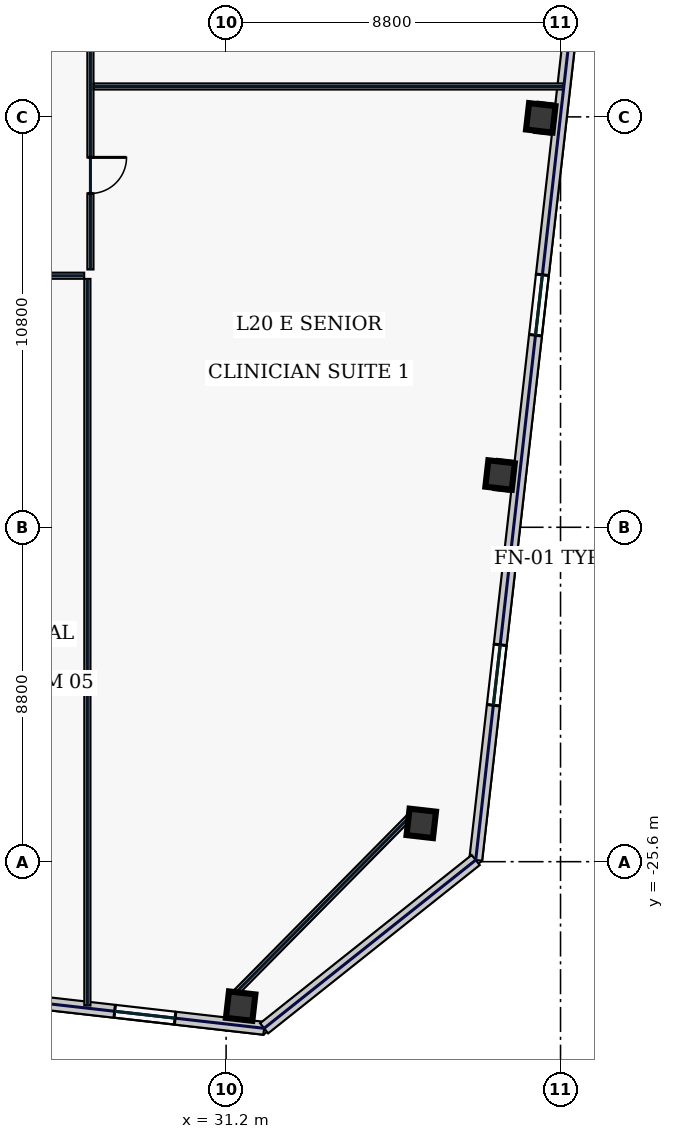
"""IFC4 building model, lengths in metres.
Left out: names, types, materials, properties, quantities, classifications, styles, units other than length and angle.
Written with IfcOpenShell. Run it as: python <this file> out.ifc"""

import sys

from ifc_helpers import new_model, si_unit, direction, frame, frame_2d, origin, origin_2d, place, context, subcontext, project, spatial, rectangle, hollow_rectangle, extrude, element, fill, save


model = new_model("IFC4")
c1 = context("Model", 3, precision=1e-05, world=origin(), true_north=direction((0.0, 1.0)))
c2 = subcontext(c1, "Body", "Model", "MODEL_VIEW")
j1 = project(units=[si_unit("LENGTHUNIT", "METRE"), si_unit("PLANEANGLEUNIT", "RADIAN")], contexts=[c1])
p1 = place(None, origin())
s1 = spatial("IfcSite", under=j1, at=p1, CompositionType="ELEMENT")
p2 = place(p1, origin())
s2 = spatial("IfcBuilding", under=s1, at=p2, CompositionType="ELEMENT")
p3 = place(p2, frame((0.0, 0.0, 93.4)))
s3 = spatial("IfcBuildingStorey", under=s2, at=p3, CompositionType="ELEMENT", Elevation=93.4)
for number, where, z_axis, x_axis in (
    (1, (31.583, -29.401, 0.0), (0.0, 0.0, 1.0), (0.994, -0.113, 0.0)),
    (2, (36.336, -24.592, 0.0), (0.0, 0.0, 1.0), (0.994, -0.113, 0.0)),
    (3, (38.409, -15.424, 0.0), (0.0, 0.0, 1.0), (0.994, -0.113, 0.0)),
    (4, (39.48, -6.025, 0.0), (0.0, 0.0, 1.0), (0.994, -0.113, 0.0)),
):
    element("IfcColumn", number, at=place(p3, frame(where, z_axis=z_axis, x_axis=x_axis)), inside=s3, PredefinedType="COLUMN", context=c2, shape_type="SweptSolid", body=[
        extrude(hollow_rectangle(XDim=0.7, YDim=0.7, WallThickness=0.032, at=origin_2d()), origin(), (0.0, 0.0, 1.0), 3.74),
    ])
p4 = place(p3, frame((11.115, -27.582, 0.0), z_axis=(0.0, 0.0, 1.0), x_axis=(0.993572655904, -0.113196190044, 0.0)))
e5 = element("IfcWall", 5, at=p4, inside=s3, PredefinedType="STANDARD", context=c2, shape_type="SweptSolid", body=[
    extrude(rectangle(XDim=21.223, YDim=0.34, at=frame_2d((10.611, 0.0))), origin(), (0.0, 0.0, 1.0), 3.74),
])
p5 = place(p4, frame((4.866, 0.0, 0.67)))
e6 = element("IfcOpeningElement", 6, at=p5, cuts=e5, PredefinedType="OPENING", context=c2, shape_type="SweptSolid", body=[
    extrude(rectangle(XDim=0.85, YDim=1.85, at=frame_2d((0.425, 0.925))), frame((0.0, 0.18, 0.0), z_axis=(0.0, -1.0, 0.0), x_axis=(1.0, 0.0, 0.0)), (0.0, 0.0, 1.0), 0.36),
])
p6 = place(p4, frame((7.838, 0.0, 0.67)))
e7 = element("IfcOpeningElement", 7, at=p6, cuts=e5, PredefinedType="OPENING", context=c2, shape_type="SweptSolid", body=[
    extrude(rectangle(XDim=0.85, YDim=1.85, at=frame_2d((0.425, 0.925))), frame((0.0, 0.18, 0.0), z_axis=(0.0, -1.0, 0.0), x_axis=(1.0, 0.0, 0.0)), (0.0, 0.0, 1.0), 0.36),
])
p7 = place(p4, frame((12.794, 0.0, 0.67)))
e8 = element("IfcOpeningElement", 8, at=p7, cuts=e5, PredefinedType="OPENING", context=c2, shape_type="SweptSolid", body=[
    extrude(rectangle(XDim=2.1, YDim=2.2, at=frame_2d((1.05, 1.1))), frame((0.0, 0.18, 0.0), z_axis=(0.0, -1.0, 0.0), x_axis=(1.0, 0.0, 0.0)), (0.0, 0.0, 1.0), 0.36),
])
p8 = place(p4, frame((17.265, 0.0, 0.22)))
e9 = element("IfcOpeningElement", 9, at=p8, cuts=e5, PredefinedType="OPENING", context=c2, shape_type="SweptSolid", body=[
    extrude(rectangle(XDim=1.6, YDim=1.2, at=frame_2d((0.8, 0.6))), frame((0.0, 0.18, 0.0), z_axis=(0.0, -1.0, 0.0), x_axis=(1.0, 0.0, 0.0)), (0.0, 0.0, 1.0), 0.36),
])
p9 = place(p3, frame((37.768, -25.556, 0.0), z_axis=(0.0, 0.0, 1.0), x_axis=(0.113201605824, 0.993572038877, 0.0)))
e10 = element("IfcWall", 10, at=p9, inside=s3, PredefinedType="STANDARD", context=c2, shape_type="SweptSolid", body=[
    extrude(rectangle(XDim=39.2, YDim=0.34, at=frame_2d((19.6, 0.0))), origin(), (0.0, 0.0, 1.0), 3.74),
])
p10 = place(p9, frame((4.1, 0.0, 0.58)))
e11 = element("IfcOpeningElement", 11, at=p10, cuts=e10, PredefinedType="OPENING", context=c2, shape_type="SweptSolid", body=[
    extrude(rectangle(XDim=1.6, YDim=2.3, at=frame_2d((0.8, 1.15))), frame((0.0, 0.18, 0.0), z_axis=(0.0, -1.0, 0.0), x_axis=(1.0, 0.0, 0.0)), (0.0, 0.0, 1.0), 0.36),
])
p11 = place(p9, frame((13.9, 0.0, 0.58)))
e12 = element("IfcOpeningElement", 12, at=p11, cuts=e10, PredefinedType="OPENING", context=c2, shape_type="SweptSolid", body=[
    extrude(rectangle(XDim=1.6, YDim=2.3, at=frame_2d((0.8, 1.15))), frame((0.0, 0.18, 0.0), z_axis=(0.0, -1.0, 0.0), x_axis=(1.0, 0.0, 0.0)), (0.0, 0.0, 1.0), 0.36),
])
p12 = place(p9, frame((23.35, 0.0, 0.75)))
e13 = element("IfcOpeningElement", 13, at=p12, cuts=e10, PredefinedType="OPENING", context=c2, shape_type="SweptSolid", body=[
    extrude(rectangle(XDim=0.85, YDim=1.85, at=frame_2d((0.425, 0.925))), frame((0.0, 0.18, 0.0), z_axis=(0.0, -1.0, 0.0), x_axis=(1.0, 0.0, 0.0)), (0.0, 0.0, 1.0), 0.36),
])
p13 = place(p9, frame((33.5, 0.0, 0.58)))
e14 = element("IfcOpeningElement", 14, at=p13, cuts=e10, PredefinedType="OPENING", context=c2, shape_type="SweptSolid", body=[
    extrude(rectangle(XDim=1.6, YDim=2.3, at=frame_2d((0.8, 1.15))), frame((0.0, 0.18, 0.0), z_axis=(0.0, -1.0, 0.0), x_axis=(1.0, 0.0, 0.0)), (0.0, 0.0, 1.0), 0.36),
])
p14 = place(p3, frame((32.201, -29.985, 0.0), z_axis=(0.0, 0.0, 1.0), x_axis=(0.78261359446, 0.622507800567, 0.0)))
e15 = element("IfcWall", 15, at=p14, inside=s3, PredefinedType="STANDARD", context=c2, shape_type="SweptSolid", body=[
    extrude(rectangle(XDim=7.114, YDim=0.34, at=frame_2d((3.557, 0.0))), origin(), (0.0, 0.0, 1.0), 3.74),
])
p15 = place(p3, frame((31.341, -29.162, 0.0), z_axis=(0.0, 0.0, 1.0), x_axis=(0.702905898933, 0.711282853192, 0.0)))
e16 = element("IfcWall", 16, at=p15, inside=s3, PredefinedType="PARTITIONING", context=c2, shape_type="SweptSolid", body=[
    extrude(rectangle(XDim=6.761, YDim=0.16, at=frame_2d((3.381, 0.0))), origin(), (0.0, 0.0, 1.0), 3.74),
])
p16 = place(p3, frame((27.63, 10.115, 0.0), z_axis=(0.0, 0.0, 1.0), x_axis=(0.0, -1.0, 0.0)))
e17 = element("IfcWall", 17, at=p16, inside=s3, PredefinedType="PARTITIONING", context=c2, shape_type="SweptSolid", body=[
    extrude(rectangle(XDim=20.13, YDim=0.16, at=frame_2d((10.065, 0.0))), origin(), (0.0, 0.0, 1.0), 3.74),
])
p17 = place(p16, frame((17.181, 0.0, 0.0)))
e18 = element("IfcOpeningElement", 18, at=p17, cuts=e17, PredefinedType="OPENING", context=c2, shape_type="SweptSolid", body=[
    extrude(rectangle(XDim=0.95, YDim=2.2, at=frame_2d((0.475, 1.1))), frame((0.0, 0.09, 0.0), z_axis=(0.0, -1.0, 0.0), x_axis=(1.0, 0.0, 0.0)), (0.0, 0.0, 1.0), 0.18),
])
p18 = place(p16, frame((12.325, 0.0, 0.0)))
e19 = element("IfcOpeningElement", 19, at=p18, cuts=e17, PredefinedType="OPENING", context=c2, shape_type="SweptSolid", body=[
    extrude(rectangle(XDim=0.95, YDim=2.2, at=frame_2d((0.475, 1.1))), frame((0.0, 0.09, 0.0), z_axis=(0.0, -1.0, 0.0), x_axis=(1.0, 0.0, 0.0)), (0.0, 0.0, 1.0), 0.18),
])
p19 = place(p16, frame((7.125, 0.0, 0.0)))
e20 = element("IfcOpeningElement", 20, at=p19, cuts=e17, PredefinedType="OPENING", context=c2, shape_type="SweptSolid", body=[
    extrude(rectangle(XDim=0.95, YDim=2.2, at=frame_2d((0.475, 1.1))), frame((0.0, 0.09, 0.0), z_axis=(0.0, -1.0, 0.0), x_axis=(1.0, 0.0, 0.0)), (0.0, 0.0, 1.0), 0.18),
])
p20 = place(p16, frame((2.219, 0.0, 0.0)))
e21 = element("IfcOpeningElement", 21, at=p20, cuts=e17, PredefinedType="OPENING", context=c2, shape_type="SweptSolid", body=[
    extrude(rectangle(XDim=0.95, YDim=2.2, at=frame_2d((0.475, 1.1))), frame((0.0, 0.09, 0.0), z_axis=(0.0, -1.0, 0.0), x_axis=(1.0, 0.0, 0.0)), (0.0, 0.0, 1.0), 0.18),
])
p21 = place(p3, frame((27.465, -10.18, 0.0), z_axis=(0.0, 0.0, 1.0), x_axis=(-1.0, 0.0, 0.0)))
e22 = element("IfcWall", 22, at=p21, inside=s3, PredefinedType="PARTITIONING", context=c2, shape_type="SweptSolid", body=[
    extrude(rectangle(XDim=54.93, YDim=0.16, at=frame_2d((27.465, 0.0))), origin(), (0.0, 0.0, 1.0), 3.74),
])
p22 = place(p21, frame((51.656, 0.0, 0.0)))
e23 = element("IfcOpeningElement", 23, at=p22, cuts=e22, PredefinedType="OPENING", context=c2, shape_type="SweptSolid", body=[
    extrude(rectangle(XDim=0.95, YDim=2.2, at=frame_2d((0.475, 1.1))), frame((0.0, 0.09, 0.0), z_axis=(0.0, -1.0, 0.0), x_axis=(1.0, 0.0, 0.0)), (0.0, 0.0, 1.0), 0.18),
])
p23 = place(p21, frame((44.747, 0.0, 0.0)))
e24 = element("IfcOpeningElement", 24, at=p23, cuts=e22, PredefinedType="OPENING", context=c2, shape_type="SweptSolid", body=[
    extrude(rectangle(XDim=1.3, YDim=2.2, at=frame_2d((0.65, 1.1))), frame((0.0, 0.09, 0.0), z_axis=(0.0, -1.0, 0.0), x_axis=(1.0, 0.0, 0.0)), (0.0, 0.0, 1.0), 0.18),
])
p24 = place(p21, frame((35.091, 0.0, 0.0)))
e25 = element("IfcOpeningElement", 25, at=p24, cuts=e22, PredefinedType="OPENING", context=c2, shape_type="SweptSolid", body=[
    extrude(rectangle(XDim=1.3, YDim=2.2, at=frame_2d((0.65, 1.1))), frame((0.0, 0.09, 0.0), z_axis=(0.0, -1.0, 0.0), x_axis=(1.0, 0.0, 0.0)), (0.0, 0.0, 1.0), 0.18),
])
p25 = place(p21, frame((29.54, 0.0, 0.0)))
e26 = element("IfcOpeningElement", 26, at=p25, cuts=e22, PredefinedType="OPENING", context=c2, shape_type="SweptSolid", body=[
    extrude(rectangle(XDim=1.45, YDim=2.2, at=frame_2d((0.725, 1.1))), frame((0.0, 0.09, 0.0), z_axis=(0.0, -1.0, 0.0), x_axis=(1.0, 0.0, 0.0)), (0.0, 0.0, 1.0), 0.18),
])
p26 = place(p21, frame((22.872, 0.0, 0.0)))
e27 = element("IfcOpeningElement", 27, at=p26, cuts=e22, PredefinedType="OPENING", context=c2, shape_type="SweptSolid", body=[
    extrude(rectangle(XDim=0.95, YDim=2.2, at=frame_2d((0.475, 1.1))), frame((0.0, 0.09, 0.0), z_axis=(0.0, -1.0, 0.0), x_axis=(1.0, 0.0, 0.0)), (0.0, 0.0, 1.0), 0.18),
])
p27 = place(p21, frame((15.78, 0.0, 0.0)))
e28 = element("IfcOpeningElement", 28, at=p27, cuts=e22, PredefinedType="OPENING", context=c2, shape_type="SweptSolid", body=[
    extrude(rectangle(XDim=0.95, YDim=2.2, at=frame_2d((0.475, 1.1))), frame((0.0, 0.09, 0.0), z_axis=(0.0, -1.0, 0.0), x_axis=(1.0, 0.0, 0.0)), (0.0, 0.0, 1.0), 0.18),
])
p28 = place(p21, frame((9.03, 0.0, 0.0)))
e29 = element("IfcOpeningElement", 29, at=p28, cuts=e22, PredefinedType="OPENING", context=c2, shape_type="SweptSolid", body=[
    extrude(rectangle(XDim=1.05, YDim=2.2, at=frame_2d((0.525, 1.1))), frame((0.0, 0.09, 0.0), z_axis=(0.0, -1.0, 0.0), x_axis=(1.0, 0.0, 0.0)), (0.0, 0.0, 1.0), 0.18),
])
p29 = place(p21, frame((3.044, 0.0, 0.0)))
e30 = element("IfcOpeningElement", 30, at=p29, cuts=e22, PredefinedType="OPENING", context=c2, shape_type="SweptSolid", body=[
    extrude(rectangle(XDim=0.95, YDim=2.2, at=frame_2d((0.475, 1.1))), frame((0.0, 0.09, 0.0), z_axis=(0.0, -1.0, 0.0), x_axis=(1.0, 0.0, 0.0)), (0.0, 0.0, 1.0), 0.18),
])
p30 = place(p3, frame((27.55, -29.385, 0.0), z_axis=(0.0, 0.0, 1.0), x_axis=(0.0, 1.0, 0.0)))
e31 = element("IfcWall", 31, at=p30, inside=s3, PredefinedType="PARTITIONING", context=c2, shape_type="SweptSolid", body=[
    extrude(rectangle(XDim=19.12, YDim=0.16, at=frame_2d((9.56, 0.0))), origin(), (0.0, 0.0, 1.0), 3.74),
])
p31 = place(p3, frame((27.715, -5.2, 0.0), z_axis=(0.0, 0.0, 1.0), x_axis=(1.0, 0.0, 0.0)))
e32 = element("IfcWall", 32, at=p31, inside=s3, PredefinedType="PARTITIONING", context=c2, shape_type="SweptSolid", body=[
    extrude(rectangle(XDim=12.352, YDim=0.16, at=frame_2d((6.176, 0.0))), origin(), (0.0, 0.0, 1.0), 3.74),
])
p32 = place(p8, origin())
e33 = element("IfcWindow", 33, at=p32, inside=s3, PartitioningType="SINGLE_PANEL", PredefinedType="WINDOW", context=c2, shape_type="SweptSolid", body=[
    extrude(rectangle(XDim=1.6, YDim=1.2, at=frame_2d((0.8, 0.6))), frame((0.0, 0.03, 0.0), z_axis=(0.0, -1.0, 0.0), x_axis=(1.0, 0.0, 0.0)), (0.0, 0.0, 1.0), 0.06),
])
fill(e9, e33)
p33 = place(p10, origin())
e34 = element("IfcWindow", 34, at=p33, inside=s3, PartitioningType="SINGLE_PANEL", PredefinedType="WINDOW", context=c2, shape_type="SweptSolid", body=[
    extrude(rectangle(XDim=1.6, YDim=2.3, at=frame_2d((0.8, 1.15))), frame((0.0, 0.03, 0.0), z_axis=(0.0, -1.0, 0.0), x_axis=(1.0, 0.0, 0.0)), (0.0, 0.0, 1.0), 0.06),
])
fill(e11, e34)
p34 = place(p11, origin())
e35 = element("IfcWindow", 35, at=p34, inside=s3, PartitioningType="SINGLE_PANEL", PredefinedType="WINDOW", context=c2, shape_type="SweptSolid", body=[
    extrude(rectangle(XDim=1.6, YDim=2.3, at=frame_2d((0.8, 1.15))), frame((0.0, 0.03, 0.0), z_axis=(0.0, -1.0, 0.0), x_axis=(1.0, 0.0, 0.0)), (0.0, 0.0, 1.0), 0.06),
])
fill(e12, e35)
p35 = place(p17, origin())
e36 = element("IfcDoor", 36, at=p35, inside=s3, OperationType="SINGLE_SWING_LEFT", PredefinedType="DOOR", context=c2, shape_type="SweptSolid", body=[
    extrude(rectangle(XDim=0.95, YDim=2.2, at=frame_2d((0.475, 1.1))), frame((0.0, 0.025, 0.0), z_axis=(0.0, -1.0, 0.0), x_axis=(1.0, 0.0, 0.0)), (0.0, 0.0, 1.0), 0.05),
])
fill(e18, e36)
save(model, sys.argv[1])
